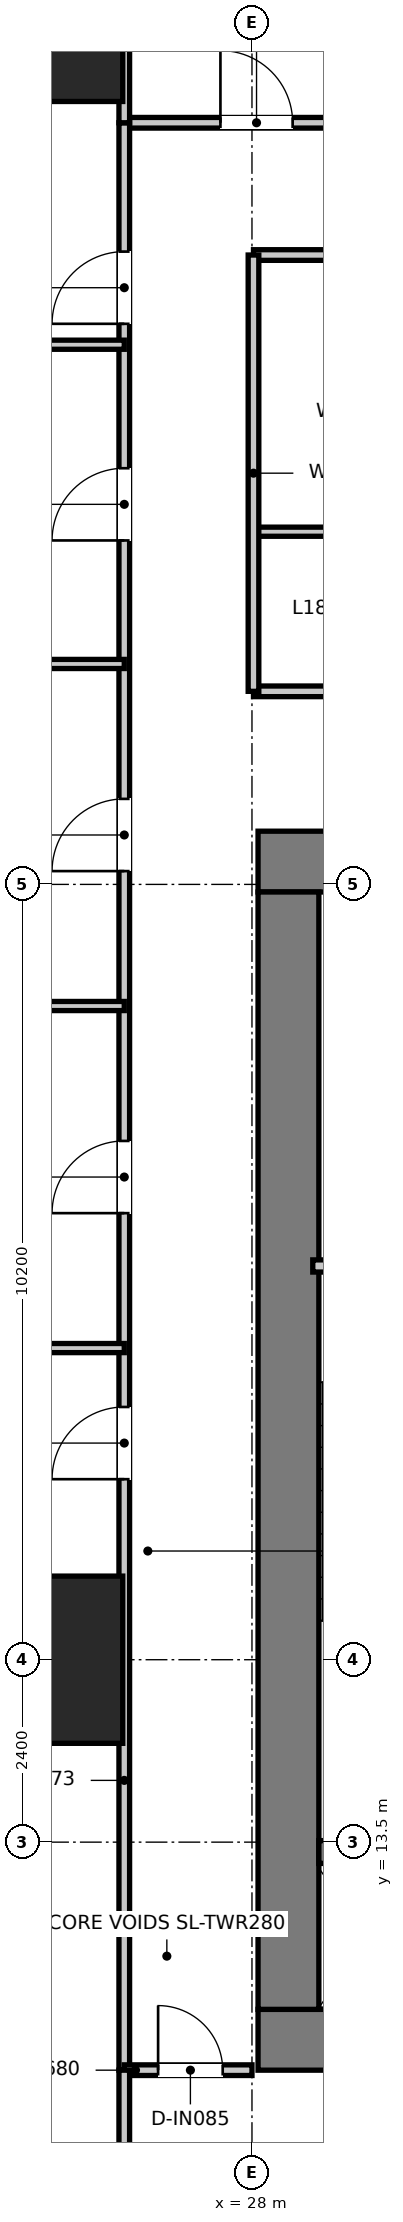
"""IFC4 building model, lengths in metres.
Left out: names, types, materials, properties, quantities, classifications, styles, units other than length and angle.
Written with IfcOpenShell. Run it as: python <this file> out.ifc"""

import sys

from ifc_helpers import new_model, si_unit, direction, frame, frame_2d, origin, origin_2d, place, context, subcontext, project, spatial, rectangle, extrude, source, transform, mapped, element, fill, save


model = new_model("IFC4")
c1 = context("Model", 3, precision=1e-05, world=origin(), true_north=direction((0.0, 1.0)))
c2 = subcontext(c1, "Body", "Model", "MODEL_VIEW")
j1 = project(units=[si_unit("LENGTHUNIT", "METRE"), si_unit("PLANEANGLEUNIT", "RADIAN")], contexts=[c1])
p1 = place(None, origin())
s1 = spatial("IfcSite", under=j1, at=p1, CompositionType="ELEMENT")
p2 = place(p1, origin())
s2 = spatial("IfcBuilding", under=s1, at=p2, CompositionType="ELEMENT")
p3 = place(p2, frame((0.0, 0.0, 76.35)))
s3 = spatial("IfcBuildingStorey", under=s2, at=p3, CompositionType="ELEMENT", Elevation=76.35)
p4 = place(p3, frame((28.08, 10.9, 0.0), z_axis=(0.0, 0.0, 1.0), x_axis=(1.0, 0.0, 0.0)))
e1 = element("IfcWall", 1, at=p4, inside=s3, PredefinedType="SHEAR", context=c2, shape_type="SweptSolid", body=[
    extrude(rectangle(XDim=15.84, YDim=0.8, at=frame_2d((7.92, 0.0))), origin(), (0.0, 0.0, 1.0), 3.95),
])
p5 = place(p3, frame((28.08, 26.4, 0.0), z_axis=(0.0, 0.0, 1.0), x_axis=(1.0, 0.0, 0.0)))
e2 = element("IfcWall", 2, at=p5, inside=s3, PredefinedType="SHEAR", context=c2, shape_type="SweptSolid", body=[
    extrude(rectangle(XDim=15.84, YDim=0.8, at=frame_2d((7.92, 0.0))), origin(), (0.0, 0.0, 1.0), 3.95),
])
p6 = place(p5, frame((7.22, 0.0, 0.0)))
e3 = element("IfcOpeningElement", 3, at=p6, cuts=e2, PredefinedType="OPENING", context=c2, shape_type="SweptSolid", body=[
    extrude(rectangle(XDim=1.4, YDim=2.2, at=frame_2d((0.7, 1.1))), frame((0.0, 0.41, 0.0), z_axis=(0.0, -1.0, 0.0), x_axis=(1.0, 0.0, 0.0)), (0.0, 0.0, 1.0), 0.82),
])
p7 = place(p5, frame((1.775, 0.0, 0.0)))
e4 = element("IfcOpeningElement", 4, at=p7, cuts=e2, PredefinedType="OPENING", context=c2, shape_type="SweptSolid", body=[
    extrude(rectangle(XDim=1.05, YDim=2.1, at=frame_2d((0.525, 1.05))), frame((0.0, 0.41, 0.0), z_axis=(0.0, -1.0, 0.0), x_axis=(1.0, 0.0, 0.0)), (0.0, 0.0, 1.0), 0.82),
])
p8 = place(p5, frame((13.015, 0.0, 0.0)))
e5 = element("IfcOpeningElement", 5, at=p8, cuts=e2, PredefinedType="OPENING", context=c2, shape_type="SweptSolid", body=[
    extrude(rectangle(XDim=1.05, YDim=2.1, at=frame_2d((0.525, 1.05))), frame((0.0, 0.41, 0.0), z_axis=(0.0, -1.0, 0.0), x_axis=(1.0, 0.0, 0.0)), (0.0, 0.0, 1.0), 0.82),
])
p9 = place(p3, frame((28.48, 11.3, 0.0), z_axis=(0.0, 0.0, 1.0), x_axis=(0.0, 1.0, 0.0)))
e6 = element("IfcWall", 6, at=p9, inside=s3, PredefinedType="SHEAR", context=c2, shape_type="SweptSolid", body=[
    extrude(rectangle(XDim=14.7, YDim=0.8, at=frame_2d((7.35, 0.0))), origin(), (0.0, 0.0, 1.0), 3.95),
])
p10 = place(p3, frame((28.88, 13.37, 0.0), z_axis=(0.0, 0.0, 1.0), x_axis=(1.0, 0.0, 0.0)))
e7 = element("IfcWall", 7, at=p10, inside=s3, PredefinedType="SHEAR", context=c2, shape_type="SweptSolid", body=[
    extrude(rectangle(XDim=3.1, YDim=0.3, at=frame_2d((1.55, 0.0))), origin(), (0.0, 0.0, 1.0), 3.95),
])
m1 = source(origin(), c2, "Body", "SweptSolid", [
    extrude(rectangle(XDim=2.2, YDim=2.2, at=origin_2d()), origin(), (0.0, 0.0, 1.0), 3.95),
])
for number, where, z_axis, x_axis in (
    (8, (25.2, 15.9, 0.0), (0.0, 0.0, 1.0), (1.0, 0.0, 0.0)),
    (9, (25.2, 37.5, 0.0), (0.0, 0.0, 1.0), (1.0, 0.0, 0.0)),
):
    element("IfcColumn", number, at=place(p3, frame(where, z_axis=z_axis, x_axis=x_axis)), inside=s3, PredefinedType="USERDEFINED", context=c2, shape_type="MappedRepresentation", body=[
        mapped(m1, transform((0.0, 0.0, 0.0), x_axis=(1.0, 0.0, 0.0), y_axis=(0.0, 1.0, 0.0), z_axis=(0.0, 0.0, 1.0), scale=1.0)),
    ])
p11 = place(p3, frame((28.8, 21.08, 0.0), z_axis=(0.0, 0.0, 1.0), x_axis=(1.0, 0.0, 0.0)))
e10 = element("IfcWall", 10, at=p11, inside=s3, PredefinedType="PARTITIONING", context=c2, shape_type="SweptSolid", body=[
    extrude(rectangle(XDim=3.16, YDim=0.16, at=frame_2d((1.58, 0.0))), origin(), (0.0, 0.0, 1.0), 3.59),
])
p12 = place(p11, frame((1.055, 0.0, 0.0)))
e11 = element("IfcOpeningElement", 11, at=p12, cuts=e10, PredefinedType="OPENING", context=c2, shape_type="SweptSolid", body=[
    extrude(rectangle(XDim=1.05, YDim=2.1, at=frame_2d((0.525, 1.05))), frame((0.0, 0.09, 0.0), z_axis=(0.0, -1.0, 0.0), x_axis=(1.0, 0.0, 0.0)), (0.0, 0.0, 1.0), 0.18),
])
p13 = place(p3, frame((28.02, 28.64, 0.0), z_axis=(0.0, 0.0, 1.0), x_axis=(1.0, 0.0, 0.0)))
e12 = element("IfcWall", 12, at=p13, inside=s3, PredefinedType="PARTITIONING", context=c2, shape_type="SweptSolid", body=[
    extrude(rectangle(XDim=15.96, YDim=0.14, at=frame_2d((7.98, 0.0))), origin(), (0.0, 0.0, 1.0), 3.0),
])
p14 = place(p13, frame((7.455, 0.0, 0.0)))
e13 = element("IfcOpeningElement", 13, at=p14, cuts=e12, PredefinedType="OPENING", context=c2, shape_type="SweptSolid", body=[
    extrude(rectangle(XDim=1.05, YDim=2.15, at=frame_2d((0.525, 1.075))), frame((0.0, 0.08, 0.0), z_axis=(0.0, -1.0, 0.0), x_axis=(1.0, 0.0, 0.0)), (0.0, 0.0, 1.0), 0.16),
])
p15 = place(p3, frame((28.02, 30.74, 0.0), z_axis=(0.0, 0.0, 1.0), x_axis=(1.0, 0.0, 0.0)))
e14 = element("IfcWall", 14, at=p15, inside=s3, PredefinedType="PARTITIONING", context=c2, shape_type="SweptSolid", body=[
    extrude(rectangle(XDim=15.96, YDim=0.12, at=frame_2d((7.98, 0.0))), origin(), (0.0, 0.0, 1.0), 3.0),
])
p16 = place(p3, frame((28.02, 34.38, 0.0), z_axis=(0.0, 0.0, 1.0), x_axis=(1.0, 0.0, 0.0)))
e15 = element("IfcWall", 15, at=p16, inside=s3, PredefinedType="PARTITIONING", context=c2, shape_type="SweptSolid", body=[
    extrude(rectangle(XDim=15.96, YDim=0.14, at=frame_2d((7.98, 0.0))), origin(), (0.0, 0.0, 1.0), 3.0),
])
p17 = place(p16, frame((1.13, 0.0, 0.0)))
e16 = element("IfcOpeningElement", 16, at=p17, cuts=e15, PredefinedType="OPENING", context=c2, shape_type="SweptSolid", body=[
    extrude(rectangle(XDim=0.9, YDim=2.1, at=frame_2d((0.45, 1.05))), frame((0.0, 0.08, 0.0), z_axis=(0.0, -1.0, 0.0), x_axis=(1.0, 0.0, 0.0)), (0.0, 0.0, 1.0), 0.16),
])
p18 = place(p16, frame((4.33, 0.0, 0.0)))
e17 = element("IfcOpeningElement", 17, at=p18, cuts=e15, PredefinedType="OPENING", context=c2, shape_type="SweptSolid", body=[
    extrude(rectangle(XDim=0.9, YDim=2.1, at=frame_2d((0.45, 1.05))), frame((0.0, 0.08, 0.0), z_axis=(0.0, -1.0, 0.0), x_axis=(1.0, 0.0, 0.0)), (0.0, 0.0, 1.0), 0.16),
])
p19 = place(p16, frame((7.355, 0.0, 0.0)))
e18 = element("IfcOpeningElement", 18, at=p19, cuts=e15, PredefinedType="OPENING", context=c2, shape_type="SweptSolid", body=[
    extrude(rectangle(XDim=0.95, YDim=2.1, at=frame_2d((0.475, 1.05))), frame((0.0, 0.08, 0.0), z_axis=(0.0, -1.0, 0.0), x_axis=(1.0, 0.0, 0.0)), (0.0, 0.0, 1.0), 0.16),
])
p20 = place(p16, frame((12.23, 0.0, 0.0)))
e19 = element("IfcOpeningElement", 19, at=p20, cuts=e15, PredefinedType="OPENING", context=c2, shape_type="SweptSolid", body=[
    extrude(rectangle(XDim=0.95, YDim=2.1, at=frame_2d((0.475, 1.05))), frame((0.0, 0.08, 0.0), z_axis=(0.0, -1.0, 0.0), x_axis=(1.0, 0.0, 0.0)), (0.0, 0.0, 1.0), 0.16),
])
p21 = place(p3, frame((28.02, 28.64, 0.0), z_axis=(0.0, 0.0, 1.0), x_axis=(0.0, 1.0, 0.0)))
e20 = element("IfcWall", 20, at=p21, inside=s3, PredefinedType="PARTITIONING", context=c2, shape_type="SweptSolid", body=[
    extrude(rectangle(XDim=5.74, YDim=0.14, at=frame_2d((2.87, 0.0))), origin(), (0.0, 0.0, 1.0), 3.14),
])
p22 = place(p3, frame((26.32, 36.12, 0.0), z_axis=(0.0, 0.0, 1.0), x_axis=(1.0, 0.0, 0.0)))
e21 = element("IfcWall", 21, at=p22, inside=s3, PredefinedType="PARTITIONING", context=c2, shape_type="SweptSolid", body=[
    extrude(rectangle(XDim=19.36, YDim=0.14, at=frame_2d((9.68, 0.0))), origin(), (0.0, 0.0, 1.0), 3.0),
])
p23 = place(p22, frame((1.265, 0.0, 0.0)))
e22 = element("IfcOpeningElement", 22, at=p23, cuts=e21, PredefinedType="OPENING", context=c2, shape_type="SweptSolid", body=[
    extrude(rectangle(XDim=0.95, YDim=2.1, at=frame_2d((0.475, 1.05))), frame((0.0, 0.08, 0.0), z_axis=(0.0, -1.0, 0.0), x_axis=(1.0, 0.0, 0.0)), (0.0, 0.0, 1.0), 0.16),
])
p24 = place(p22, frame((5.305, 0.0, 0.0)))
e23 = element("IfcOpeningElement", 23, at=p24, cuts=e21, PredefinedType="OPENING", context=c2, shape_type="SweptSolid", body=[
    extrude(rectangle(XDim=0.95, YDim=2.1, at=frame_2d((0.475, 1.05))), frame((0.0, 0.08, 0.0), z_axis=(0.0, -1.0, 0.0), x_axis=(1.0, 0.0, 0.0)), (0.0, 0.0, 1.0), 0.16),
])
p25 = place(p22, frame((9.905, 0.0, 0.0)))
e24 = element("IfcOpeningElement", 24, at=p25, cuts=e21, PredefinedType="OPENING", context=c2, shape_type="SweptSolid", body=[
    extrude(rectangle(XDim=0.95, YDim=2.1, at=frame_2d((0.475, 1.05))), frame((0.0, 0.08, 0.0), z_axis=(0.0, -1.0, 0.0), x_axis=(1.0, 0.0, 0.0)), (0.0, 0.0, 1.0), 0.16),
])
p26 = place(p22, frame((14.305, 0.0, 0.0)))
e25 = element("IfcOpeningElement", 25, at=p26, cuts=e21, PredefinedType="OPENING", context=c2, shape_type="SweptSolid", body=[
    extrude(rectangle(XDim=0.95, YDim=2.1, at=frame_2d((0.475, 1.05))), frame((0.0, 0.08, 0.0), z_axis=(0.0, -1.0, 0.0), x_axis=(1.0, 0.0, 0.0)), (0.0, 0.0, 1.0), 0.16),
])
p27 = place(p22, frame((17.645, 0.0, 0.0)))
e26 = element("IfcOpeningElement", 26, at=p27, cuts=e21, PredefinedType="OPENING", context=c2, shape_type="SweptSolid", body=[
    extrude(rectangle(XDim=0.95, YDim=2.1, at=frame_2d((0.475, 1.05))), frame((0.0, 0.08, 0.0), z_axis=(0.0, -1.0, 0.0), x_axis=(1.0, 0.0, 0.0)), (0.0, 0.0, 1.0), 0.16),
])
p28 = place(p3, frame((26.32, 10.5, 0.0), z_axis=(0.0, 0.0, 1.0), x_axis=(0.0, 1.0, 0.0)))
e27 = element("IfcWall", 27, at=p28, inside=s3, PredefinedType="PARTITIONING", context=c2, shape_type="SweptSolid", body=[
    extrude(rectangle(XDim=25.62, YDim=0.14, at=frame_2d((12.81, 0.0))), origin(), (0.0, 0.0, 1.0), 2.89),
])
p29 = place(p28, frame((7.775, 0.0, 0.0)))
e28 = element("IfcOpeningElement", 28, at=p29, cuts=e27, PredefinedType="OPENING", context=c2, shape_type="SweptSolid", body=[
    extrude(rectangle(XDim=0.95, YDim=2.1, at=frame_2d((0.475, 1.05))), frame((0.0, 0.08, 0.0), z_axis=(0.0, -1.0, 0.0), x_axis=(1.0, 0.0, 0.0)), (0.0, 0.0, 1.0), 0.16),
])
p30 = place(p28, frame((11.275, 0.0, 0.0)))
e29 = element("IfcOpeningElement", 29, at=p30, cuts=e27, PredefinedType="OPENING", context=c2, shape_type="SweptSolid", body=[
    extrude(rectangle(XDim=0.95, YDim=2.1, at=frame_2d((0.475, 1.05))), frame((0.0, 0.08, 0.0), z_axis=(0.0, -1.0, 0.0), x_axis=(1.0, 0.0, 0.0)), (0.0, 0.0, 1.0), 0.16),
])
p31 = place(p28, frame((15.775, 0.0, 0.0)))
e30 = element("IfcOpeningElement", 30, at=p31, cuts=e27, PredefinedType="OPENING", context=c2, shape_type="SweptSolid", body=[
    extrude(rectangle(XDim=0.95, YDim=2.1, at=frame_2d((0.475, 1.05))), frame((0.0, 0.08, 0.0), z_axis=(0.0, -1.0, 0.0), x_axis=(1.0, 0.0, 0.0)), (0.0, 0.0, 1.0), 0.16),
])
p32 = place(p28, frame((20.125, 0.0, 0.0)))
e31 = element("IfcOpeningElement", 31, at=p32, cuts=e27, PredefinedType="OPENING", context=c2, shape_type="SweptSolid", body=[
    extrude(rectangle(XDim=0.95, YDim=2.1, at=frame_2d((0.475, 1.05))), frame((0.0, 0.08, 0.0), z_axis=(0.0, -1.0, 0.0), x_axis=(1.0, 0.0, 0.0)), (0.0, 0.0, 1.0), 0.16),
])
p33 = place(p28, frame((22.975, 0.0, 0.0)))
e32 = element("IfcOpeningElement", 32, at=p33, cuts=e27, PredefinedType="OPENING", context=c2, shape_type="SweptSolid", body=[
    extrude(rectangle(XDim=0.95, YDim=2.1, at=frame_2d((0.475, 1.05))), frame((0.0, 0.08, 0.0), z_axis=(0.0, -1.0, 0.0), x_axis=(1.0, 0.0, 0.0)), (0.0, 0.0, 1.0), 0.16),
])
p34 = place(p3, frame((26.32, 10.5, 0.0), z_axis=(0.0, 0.0, 1.0), x_axis=(1.0, 0.0, 0.0)))
e33 = element("IfcWall", 33, at=p34, inside=s3, PredefinedType="PARTITIONING", context=c2, shape_type="SweptSolid", body=[
    extrude(rectangle(XDim=1.68, YDim=0.14, at=frame_2d((0.84, 0.0))), origin(), (0.0, 0.0, 1.0), 3.59),
])
p35 = place(p34, frame((0.445, 0.0, 0.0)))
e34 = element("IfcOpeningElement", 34, at=p35, cuts=e33, PredefinedType="OPENING", context=c2, shape_type="SweptSolid", body=[
    extrude(rectangle(XDim=0.85, YDim=2.1, at=frame_2d((0.425, 1.05))), frame((0.0, 0.08, 0.0), z_axis=(0.0, -1.0, 0.0), x_axis=(1.0, 0.0, 0.0)), (0.0, 0.0, 1.0), 0.16),
])
p36 = place(p3, frame((26.32, 36.12, 0.0), z_axis=(0.0, 0.0, 1.0), x_axis=(0.0, 1.0, 0.0)))
e35 = element("IfcWall", 35, at=p36, inside=s3, PredefinedType="PARTITIONING", context=c2, shape_type="SweptSolid", body=[
    extrude(rectangle(XDim=17.213, YDim=0.14, at=frame_2d((8.606, 0.0))), origin(), (0.0, 0.0, 1.0), 2.89),
])
p37 = place(p3, frame((26.32, 2.96, 0.0), z_axis=(0.0, 0.0, 1.0), x_axis=(0.0, 1.0, 0.0)))
e36 = element("IfcWall", 36, at=p37, inside=s3, PredefinedType="PARTITIONING", context=c2, shape_type="SweptSolid", body=[
    extrude(rectangle(XDim=7.54, YDim=0.14, at=frame_2d((3.77, 0.0))), origin(), (0.0, 0.0, 1.0), 3.59),
])
p38 = place(p3, frame((9.812, 20.0, 0.0), z_axis=(0.0, 0.0, 1.0), x_axis=(1.0, 0.0, 0.0)))
e37 = element("IfcWall", 37, at=p38, inside=s3, PredefinedType="PARTITIONING", context=c2, shape_type="SweptSolid", body=[
    extrude(rectangle(XDim=16.508, YDim=0.12, at=frame_2d((8.254, 0.0))), origin(), (0.0, 0.0, 1.0), 2.89),
])
p39 = place(p3, frame((10.485, 24.5, 0.0), z_axis=(0.0, 0.0, 1.0), x_axis=(1.0, 0.0, 0.0)))
e38 = element("IfcWall", 38, at=p39, inside=s3, PredefinedType="PARTITIONING", context=c2, shape_type="SweptSolid", body=[
    extrude(rectangle(XDim=15.835, YDim=0.12, at=frame_2d((7.918, 0.0))), origin(), (0.0, 0.0, 1.0), 2.89),
])
p40 = place(p3, frame((11.157, 29.0, 0.0), z_axis=(0.0, 0.0, 1.0), x_axis=(1.0, 0.0, 0.0)))
e39 = element("IfcWall", 39, at=p40, inside=s3, PredefinedType="PARTITIONING", context=c2, shape_type="SweptSolid", body=[
    extrude(rectangle(XDim=15.163, YDim=0.12, at=frame_2d((7.582, 0.0))), origin(), (0.0, 0.0, 1.0), 2.89),
])
p41 = place(p3, frame((11.785, 33.2, 0.0), z_axis=(0.0, 0.0, 1.0), x_axis=(1.0, 0.0, 0.0)))
e40 = element("IfcWall", 40, at=p41, inside=s3, PredefinedType="PARTITIONING", context=c2, shape_type="SweptSolid", body=[
    extrude(rectangle(XDim=14.535, YDim=0.12, at=frame_2d((7.268, 0.0))), origin(), (0.0, 0.0, 1.0), 2.89),
])
p42 = place(p23, origin())
e41 = element("IfcDoor", 41, at=p42, inside=s3, OperationType="SINGLE_SWING_LEFT", PredefinedType="DOOR", context=c2, shape_type="SweptSolid", body=[
    extrude(rectangle(XDim=0.95, YDim=2.1, at=frame_2d((0.475, 1.05))), frame((0.0, 0.025, 0.0), z_axis=(0.0, -1.0, 0.0), x_axis=(1.0, 0.0, 0.0)), (0.0, 0.0, 1.0), 0.05),
])
fill(e22, e41)
p43 = place(p29, origin())
e42 = element("IfcDoor", 42, at=p43, inside=s3, OperationType="SINGLE_SWING_LEFT", PredefinedType="DOOR", context=c2, shape_type="SweptSolid", body=[
    extrude(rectangle(XDim=0.95, YDim=2.1, at=frame_2d((0.475, 1.05))), frame((0.0, 0.025, 0.0), z_axis=(0.0, -1.0, 0.0), x_axis=(1.0, 0.0, 0.0)), (0.0, 0.0, 1.0), 0.05),
])
fill(e28, e42)
p44 = place(p30, origin())
e43 = element("IfcDoor", 43, at=p44, inside=s3, OperationType="SINGLE_SWING_LEFT", PredefinedType="DOOR", context=c2, shape_type="SweptSolid", body=[
    extrude(rectangle(XDim=0.95, YDim=2.1, at=frame_2d((0.475, 1.05))), frame((0.0, 0.025, 0.0), z_axis=(0.0, -1.0, 0.0), x_axis=(1.0, 0.0, 0.0)), (0.0, 0.0, 1.0), 0.05),
])
fill(e29, e43)
p45 = place(p31, origin())
e44 = element("IfcDoor", 44, at=p45, inside=s3, OperationType="SINGLE_SWING_LEFT", PredefinedType="DOOR", context=c2, shape_type="SweptSolid", body=[
    extrude(rectangle(XDim=0.95, YDim=2.1, at=frame_2d((0.475, 1.05))), frame((0.0, 0.025, 0.0), z_axis=(0.0, -1.0, 0.0), x_axis=(1.0, 0.0, 0.0)), (0.0, 0.0, 1.0), 0.05),
])
fill(e30, e44)
p46 = place(p32, origin())
e45 = element("IfcDoor", 45, at=p46, inside=s3, OperationType="SINGLE_SWING_LEFT", PredefinedType="DOOR", context=c2, shape_type="SweptSolid", body=[
    extrude(rectangle(XDim=0.95, YDim=2.1, at=frame_2d((0.475, 1.05))), frame((0.0, 0.025, 0.0), z_axis=(0.0, -1.0, 0.0), x_axis=(1.0, 0.0, 0.0)), (0.0, 0.0, 1.0), 0.05),
])
fill(e31, e45)
p47 = place(p33, origin())
e46 = element("IfcDoor", 46, at=p47, inside=s3, OperationType="SINGLE_SWING_LEFT", PredefinedType="DOOR", context=c2, shape_type="SweptSolid", body=[
    extrude(rectangle(XDim=0.95, YDim=2.1, at=frame_2d((0.475, 1.05))), frame((0.0, 0.025, 0.0), z_axis=(0.0, -1.0, 0.0), x_axis=(1.0, 0.0, 0.0)), (0.0, 0.0, 1.0), 0.05),
])
fill(e32, e46)
p48 = place(p35, origin())
e47 = element("IfcDoor", 47, at=p48, inside=s3, OperationType="SINGLE_SWING_LEFT", PredefinedType="DOOR", context=c2, shape_type="SweptSolid", body=[
    extrude(rectangle(XDim=0.85, YDim=2.1, at=frame_2d((0.425, 1.05))), frame((0.0, 0.025, 0.0), z_axis=(0.0, -1.0, 0.0), x_axis=(1.0, 0.0, 0.0)), (0.0, 0.0, 1.0), 0.05),
])
fill(e34, e47)
save(model, sys.argv[1])
